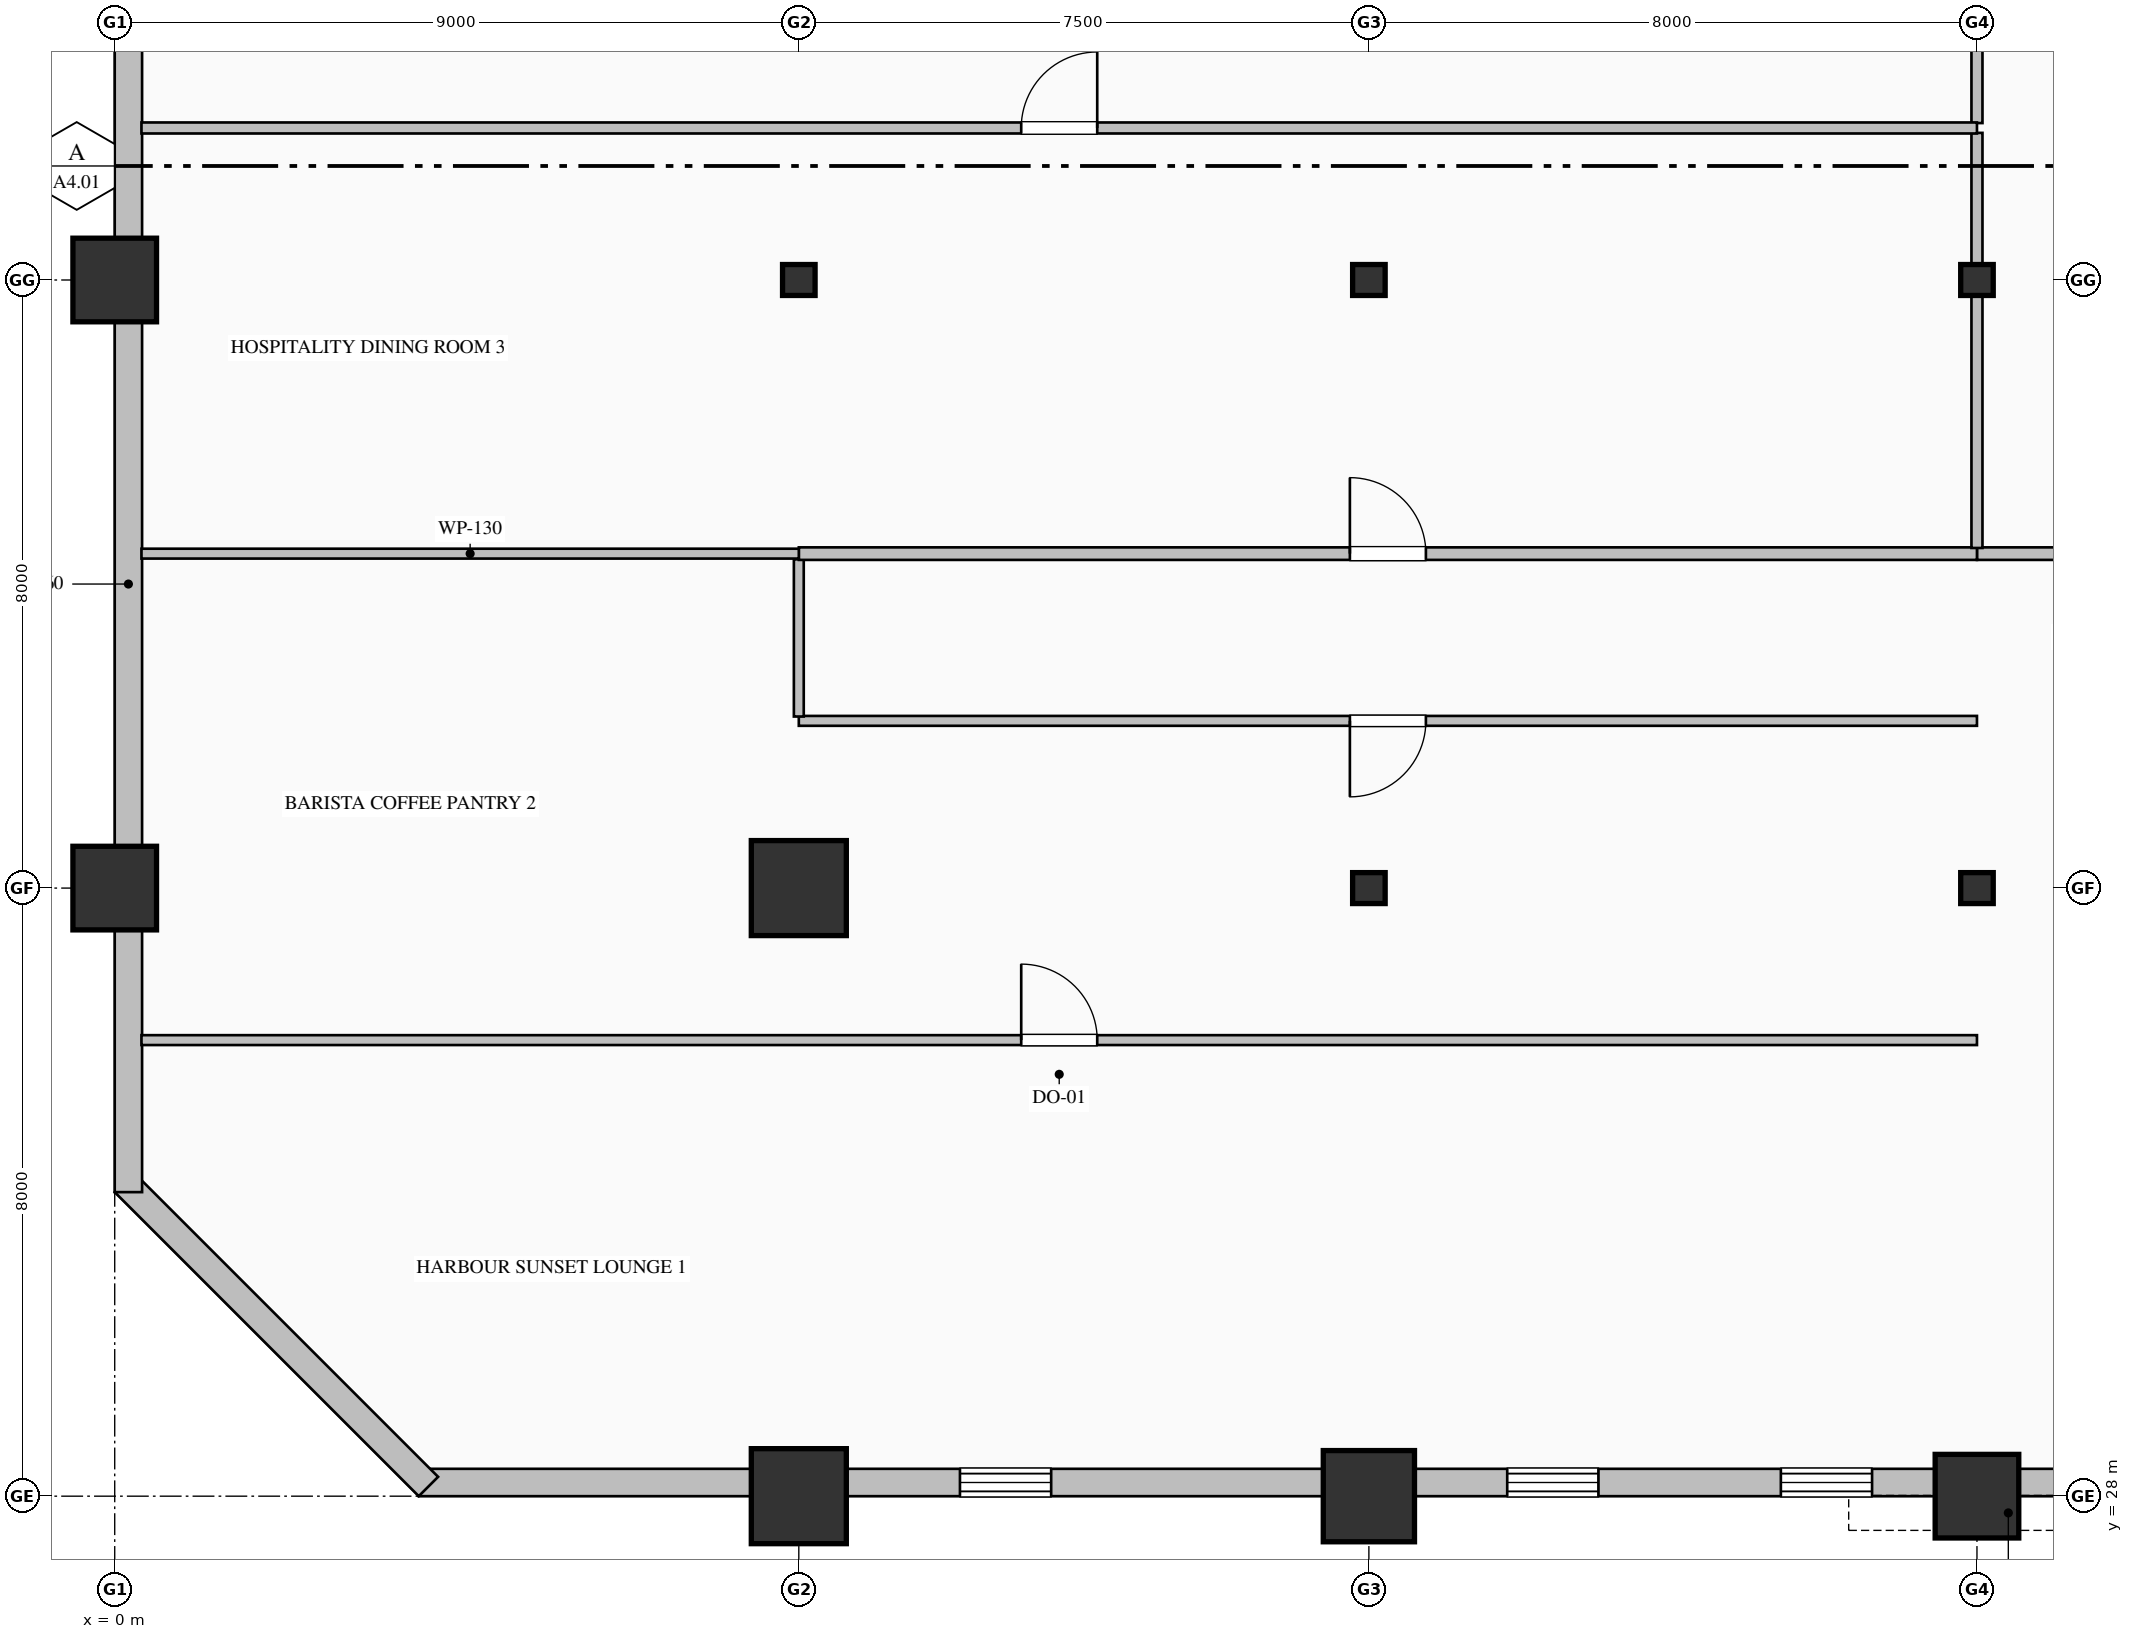
"""IFC4 building model, lengths in metres.
Left out: names, types, materials, properties, quantities, classifications, styles, units other than length and angle.
Written with IfcOpenShell. Run it as: python <this file> out.ifc"""

import sys

from ifc_helpers import new_model, si_unit, direction, frame, frame_2d, origin, origin_2d, place, context, subcontext, project, spatial, rectangle, hollow_rectangle, hollow_circle, i_section, extrude, element, fill, save


model = new_model("IFC4")
c1 = context("Model", 3, precision=1e-05, world=origin(), true_north=direction((0.0, 1.0)))
c2 = subcontext(c1, "Body", "Model", "MODEL_VIEW")
j1 = project(units=[si_unit("LENGTHUNIT", "METRE"), si_unit("PLANEANGLEUNIT", "RADIAN")], contexts=[c1])
p1 = place(None, origin())
s1 = spatial("IfcSite", under=j1, at=p1, CompositionType="ELEMENT")
p2 = place(p1, origin())
s2 = spatial("IfcBuilding", under=s1, at=p2, CompositionType="ELEMENT")
p3 = place(p2, frame((0.0, 0.0, 76.2)))
s3 = spatial("IfcBuildingStorey", under=s2, at=p3, CompositionType="ELEMENT", Elevation=76.2)
for number, where, z_axis, x_axis in (
    (1, (0.0, 36.0, 0.0), (0.0, 0.0, 1.0), (1.0, 0.0, 0.0)),
    (2, (0.0, 44.0, 0.0), (0.0, 0.0, 1.0), (1.0, 0.0, 0.0)),
):
    element("IfcColumn", number, at=place(p3, frame(where, z_axis=z_axis, x_axis=x_axis)), inside=s3, PredefinedType="COLUMN", context=c2, shape_type="SweptSolid", body=[
        extrude(hollow_rectangle(XDim=1.1, YDim=1.1, WallThickness=0.04, at=origin_2d()), origin(), (0.0, 0.0, 1.0), 4.0),
    ])
for number, where, z_axis, x_axis in (
    (3, (9.0, 28.0, 0.0), (0.0, 0.0, 1.0), (1.0, 0.0, 0.0)),
    (4, (9.0, 36.0, 0.0), (0.0, 0.0, 1.0), (1.0, 0.0, 0.0)),
):
    element("IfcColumn", number, at=place(p3, frame(where, z_axis=z_axis, x_axis=x_axis)), inside=s3, PredefinedType="COLUMN", context=c2, shape_type="SweptSolid", body=[
        extrude(hollow_rectangle(XDim=1.25, YDim=1.25, WallThickness=0.045, at=origin_2d()), origin(), (0.0, 0.0, 1.0), 4.0),
    ])
p4 = place(p3, frame((9.0, 44.0, 0.0), z_axis=(0.0, 0.0, 1.0), x_axis=(1.0, 0.0, 0.0)))
e5 = element("IfcColumn", 5, at=p4, inside=s3, PredefinedType="COLUMN", context=c2, shape_type="SweptSolid", body=[
    extrude(i_section(OverallWidth=0.407, OverallDepth=0.428, WebThickness=0.02, FlangeThickness=0.035, FilletRadius=0.022, at=origin_2d()), origin(), (0.0, 0.0, 1.0), 4.0),
])
p5 = place(p3, frame((16.5, 28.0, 0.0), z_axis=(0.0, 0.0, 1.0), x_axis=(1.0, 0.0, 0.0)))
e6 = element("IfcColumn", 6, at=p5, inside=s3, PredefinedType="COLUMN", context=c2, shape_type="SweptSolid", body=[
    extrude(hollow_circle(Radius=0.6, WallThickness=0.04, at=origin_2d()), origin(), (0.0, 0.0, 1.0), 4.0),
])
for number, where, z_axis, x_axis in (
    (7, (16.5, 36.0, 0.0), (0.0, 0.0, 1.0), (1.0, 0.0, 0.0)),
    (8, (16.5, 44.0, 0.0), (0.0, 0.0, 1.0), (1.0, 0.0, 0.0)),
):
    element("IfcColumn", number, at=place(p3, frame(where, z_axis=z_axis, x_axis=x_axis)), inside=s3, PredefinedType="COLUMN", context=c2, shape_type="SweptSolid", body=[
        extrude(i_section(OverallWidth=0.407, OverallDepth=0.428, WebThickness=0.02, FlangeThickness=0.035, FilletRadius=0.022, at=origin_2d()), origin(), (0.0, 0.0, 1.0), 4.0),
    ])
p6 = place(p3, frame((24.5, 28.0, 0.0), z_axis=(0.0, 0.0, 1.0), x_axis=(1.0, 0.0, 0.0)))
e9 = element("IfcColumn", 9, at=p6, inside=s3, PredefinedType="COLUMN", context=c2, shape_type="SweptSolid", body=[
    extrude(hollow_rectangle(XDim=1.1, YDim=1.1, WallThickness=0.04, at=origin_2d()), origin(), (0.0, 0.0, 1.0), 4.0),
])
for number, where, z_axis, x_axis in (
    (10, (24.5, 36.0, 0.0), (0.0, 0.0, 1.0), (1.0, 0.0, 0.0)),
    (11, (24.5, 44.0, 0.0), (0.0, 0.0, 1.0), (1.0, 0.0, 0.0)),
):
    element("IfcColumn", number, at=place(p3, frame(where, z_axis=z_axis, x_axis=x_axis)), inside=s3, PredefinedType="COLUMN", context=c2, shape_type="SweptSolid", body=[
        extrude(i_section(OverallWidth=0.407, OverallDepth=0.428, WebThickness=0.02, FlangeThickness=0.035, FilletRadius=0.022, at=origin_2d()), origin(), (0.0, 0.0, 1.0), 4.0),
    ])
p7 = place(p3, frame((40.52, 28.18, 0.0), z_axis=(0.0, 0.0, 1.0), x_axis=(-1.0, 0.0, 0.0)))
e12 = element("IfcWall", 12, at=p7, inside=s3, PredefinedType="SOLIDWALL", context=c2, shape_type="SweptSolid", body=[
    extrude(rectangle(XDim=36.52, YDim=0.36, at=frame_2d((18.26, 0.0))), origin(), (0.0, 0.0, 1.0), 3.05),
])
p8 = place(p7, frame((3.0, 0.0, 0.7)))
e13 = element("IfcOpeningElement", 13, at=p8, cuts=e12, PredefinedType="OPENING", context=c2, shape_type="SweptSolid", body=[
    extrude(rectangle(XDim=1.2, YDim=1.85, at=frame_2d((0.6, 0.925))), frame((0.0, 0.19, 0.0), z_axis=(0.0, -1.0, 0.0), x_axis=(1.0, 0.0, 0.0)), (0.0, 0.0, 1.0), 0.38),
])
p9 = place(p7, frame((10.2, 0.0, 0.7)))
e14 = element("IfcOpeningElement", 14, at=p9, cuts=e12, PredefinedType="OPENING", context=c2, shape_type="SweptSolid", body=[
    extrude(rectangle(XDim=1.2, YDim=1.85, at=frame_2d((0.6, 0.925))), frame((0.0, 0.19, 0.0), z_axis=(0.0, -1.0, 0.0), x_axis=(1.0, 0.0, 0.0)), (0.0, 0.0, 1.0), 0.38),
])
p10 = place(p7, frame((13.8, 0.0, 0.7)))
e15 = element("IfcOpeningElement", 15, at=p10, cuts=e12, PredefinedType="OPENING", context=c2, shape_type="SweptSolid", body=[
    extrude(rectangle(XDim=1.2, YDim=1.85, at=frame_2d((0.6, 0.925))), frame((0.0, 0.19, 0.0), z_axis=(0.0, -1.0, 0.0), x_axis=(1.0, 0.0, 0.0)), (0.0, 0.0, 1.0), 0.38),
])
p11 = place(p7, frame((17.4, 0.0, 0.7)))
e16 = element("IfcOpeningElement", 16, at=p11, cuts=e12, PredefinedType="OPENING", context=c2, shape_type="SweptSolid", body=[
    extrude(rectangle(XDim=1.2, YDim=1.85, at=frame_2d((0.6, 0.925))), frame((0.0, 0.19, 0.0), z_axis=(0.0, -1.0, 0.0), x_axis=(1.0, 0.0, 0.0)), (0.0, 0.0, 1.0), 0.38),
])
p12 = place(p7, frame((21.0, 0.0, 0.7)))
e17 = element("IfcOpeningElement", 17, at=p12, cuts=e12, PredefinedType="OPENING", context=c2, shape_type="SweptSolid", body=[
    extrude(rectangle(XDim=1.2, YDim=1.85, at=frame_2d((0.6, 0.925))), frame((0.0, 0.19, 0.0), z_axis=(0.0, -1.0, 0.0), x_axis=(1.0, 0.0, 0.0)), (0.0, 0.0, 1.0), 0.38),
])
p13 = place(p7, frame((28.2, 0.0, 0.7)))
e18 = element("IfcOpeningElement", 18, at=p13, cuts=e12, PredefinedType="OPENING", context=c2, shape_type="SweptSolid", body=[
    extrude(rectangle(XDim=1.2, YDim=1.85, at=frame_2d((0.6, 0.925))), frame((0.0, 0.19, 0.0), z_axis=(0.0, -1.0, 0.0), x_axis=(1.0, 0.0, 0.0)), (0.0, 0.0, 1.0), 0.38),
])
p14 = place(p3, frame((4.127, 28.127, 0.0), z_axis=(0.0, 0.0, 1.0), x_axis=(-0.707106781187, 0.707106781187, 0.0)))
e19 = element("IfcWall", 19, at=p14, inside=s3, PredefinedType="SOLIDWALL", context=c2, shape_type="SweptSolid", body=[
    extrude(rectangle(XDim=5.657, YDim=0.36, at=frame_2d((2.828, 0.0))), origin(), (0.0, 0.0, 1.0), 3.75),
])
p15 = place(p3, frame((0.18, 32.0, 0.0), z_axis=(0.0, 0.0, 1.0), x_axis=(0.0, 1.0, 0.0)))
e20 = element("IfcWall", 20, at=p15, inside=s3, PredefinedType="SOLIDWALL", context=c2, shape_type="SweptSolid", body=[
    extrude(rectangle(XDim=16.0, YDim=0.36, at=frame_2d((8.0, 0.0))), origin(), (0.0, 0.0, 1.0), 3.25),
])
p16 = place(p3, frame((24.5, 40.4, 0.0), z_axis=(0.0, 0.0, 1.0), x_axis=(1.0, 0.0, 0.0)))
e21 = element("IfcWall", 21, at=p16, inside=s3, PredefinedType="PARTITIONING", context=c2, shape_type="SweptSolid", body=[
    extrude(rectangle(XDim=13.3, YDim=0.165, at=frame_2d((6.65, 0.0))), origin(), (0.0, 0.0, 1.0), 3.75),
])
p17 = place(p16, frame((6.15, 0.0, 0.0)))
e22 = element("IfcOpeningElement", 22, at=p17, cuts=e21, PredefinedType="OPENING", context=c2, shape_type="SweptSolid", body=[
    extrude(rectangle(XDim=1.0, YDim=2.15, at=frame_2d((0.5, 1.075))), frame((0.0, 0.093, 0.0), z_axis=(0.0, -1.0, 0.0), x_axis=(1.0, 0.0, 0.0)), (0.0, 0.0, 1.0), 0.185),
])
p18 = place(p3, frame((24.5, 38.2, 0.0), z_axis=(0.0, 0.0, 1.0), x_axis=(-1.0, 0.0, 0.0)))
e23 = element("IfcWall", 23, at=p18, inside=s3, PredefinedType="PARTITIONING", context=c2, shape_type="SweptSolid", body=[
    extrude(rectangle(XDim=15.5, YDim=0.13, at=frame_2d((7.75, 0.0))), origin(), (0.0, 0.0, 1.0), 3.75),
])
p19 = place(p18, frame((7.25, 0.0, 0.0)))
e24 = element("IfcOpeningElement", 24, at=p19, cuts=e23, PredefinedType="OPENING", context=c2, shape_type="SweptSolid", body=[
    extrude(rectangle(XDim=1.0, YDim=2.15, at=frame_2d((0.5, 1.075))), frame((0.0, 0.075, 0.0), z_axis=(0.0, -1.0, 0.0), x_axis=(1.0, 0.0, 0.0)), (0.0, 0.0, 1.0), 0.15),
])
p20 = place(p3, frame((9.0, 38.257, 0.0), z_axis=(0.0, 0.0, 1.0), x_axis=(0.0, 1.0, 0.0)))
e25 = element("IfcWall", 25, at=p20, inside=s3, PredefinedType="PARTITIONING", context=c2, shape_type="SweptSolid", body=[
    extrude(rectangle(XDim=2.068, YDim=0.13, at=frame_2d((1.034, 0.0))), origin(), (0.0, 0.0, 1.0), 3.042),
])
p21 = place(p3, frame((9.0, 40.4, 0.0), z_axis=(0.0, 0.0, 1.0), x_axis=(1.0, 0.0, 0.0)))
e26 = element("IfcWall", 26, at=p21, inside=s3, PredefinedType="PARTITIONING", context=c2, shape_type="SweptSolid", body=[
    extrude(rectangle(XDim=15.5, YDim=0.165, at=frame_2d((7.75, 0.0))), origin(), (0.0, 0.0, 1.0), 3.75),
])
p22 = place(p21, frame((7.25, 0.0, 0.0)))
e27 = element("IfcOpeningElement", 27, at=p22, cuts=e26, PredefinedType="OPENING", context=c2, shape_type="SweptSolid", body=[
    extrude(rectangle(XDim=1.0, YDim=2.15, at=frame_2d((0.5, 1.075))), frame((0.0, 0.093, 0.0), z_axis=(0.0, -1.0, 0.0), x_axis=(1.0, 0.0, 0.0)), (0.0, 0.0, 1.0), 0.185),
])
p23 = place(p3, frame((24.5, 40.475, 0.0), z_axis=(0.0, 0.0, 1.0), x_axis=(0.0, 1.0, 0.0)))
e28 = element("IfcWall", 28, at=p23, inside=s3, PredefinedType="PARTITIONING", context=c2, shape_type="SweptSolid", body=[
    extrude(rectangle(XDim=5.461, YDim=0.145, at=frame_2d((2.73, 0.0))), origin(), (0.0, 0.0, 1.0), 3.042),
])
p24 = place(p3, frame((24.5, 46.064, 0.0), z_axis=(0.0, 0.0, 1.0), x_axis=(0.0, 1.0, 0.0)))
e29 = element("IfcWall", 29, at=p24, inside=s3, PredefinedType="PARTITIONING", context=c2, shape_type="SweptSolid", body=[
    extrude(rectangle(XDim=5.583, YDim=0.145, at=frame_2d((2.792, 0.0))), origin(), (0.0, 0.0, 1.0), 3.042),
])
p25 = place(p3, frame((0.352, 34.0, 0.0), z_axis=(0.0, 0.0, 1.0), x_axis=(1.0, 0.0, 0.0)))
e30 = element("IfcWall", 30, at=p25, inside=s3, PredefinedType="PARTITIONING", context=c2, shape_type="SweptSolid", body=[
    extrude(rectangle(XDim=24.148, YDim=0.13, at=frame_2d((12.074, 0.0))), origin(), (0.0, 0.0, 1.0), 3.75),
])
p26 = place(p25, frame((11.574, 0.0, 0.0)))
e31 = element("IfcOpeningElement", 31, at=p26, cuts=e30, PredefinedType="OPENING", context=c2, shape_type="SweptSolid", body=[
    extrude(rectangle(XDim=1.0, YDim=2.15, at=frame_2d((0.5, 1.075))), frame((0.0, 0.075, 0.0), z_axis=(0.0, -1.0, 0.0), x_axis=(1.0, 0.0, 0.0)), (0.0, 0.0, 1.0), 0.15),
])
p27 = place(p3, frame((0.352, 40.4, 0.0), z_axis=(0.0, 0.0, 1.0), x_axis=(1.0, 0.0, 0.0)))
e32 = element("IfcWall", 32, at=p27, inside=s3, PredefinedType="PARTITIONING", context=c2, shape_type="SweptSolid", body=[
    extrude(rectangle(XDim=8.648, YDim=0.13, at=frame_2d((4.324, 0.0))), origin(), (0.0, 0.0, 1.0), 3.75),
])
p28 = place(p3, frame((0.352, 46.0, 0.0), z_axis=(0.0, 0.0, 1.0), x_axis=(1.0, 0.0, 0.0)))
e33 = element("IfcWall", 33, at=p28, inside=s3, PredefinedType="PARTITIONING", context=c2, shape_type="SweptSolid", body=[
    extrude(rectangle(XDim=24.148, YDim=0.145, at=frame_2d((12.074, 0.0))), origin(), (0.0, 0.0, 1.0), 3.75),
])
p29 = place(p28, frame((11.574, 0.0, 0.0)))
e34 = element("IfcOpeningElement", 34, at=p29, cuts=e33, PredefinedType="OPENING", context=c2, shape_type="SweptSolid", body=[
    extrude(rectangle(XDim=1.0, YDim=2.15, at=frame_2d((0.5, 1.075))), frame((0.0, 0.083, 0.0), z_axis=(0.0, -1.0, 0.0), x_axis=(1.0, 0.0, 0.0)), (0.0, 0.0, 1.0), 0.165),
])
p30 = place(p11, origin())
e35 = element("IfcWindow", 35, at=p30, inside=s3, PartitioningType="DOUBLE_PANEL_VERTICAL", PredefinedType="WINDOW", context=c2, shape_type="SweptSolid", body=[
    extrude(rectangle(XDim=1.2, YDim=1.85, at=frame_2d((0.6, 0.925))), frame((0.0, 0.15, 0.0), z_axis=(0.0, -1.0, 0.0), x_axis=(1.0, 0.0, 0.0)), (0.0, 0.0, 1.0), 0.06),
])
fill(e16, e35)
p31 = place(p12, origin())
e36 = element("IfcWindow", 36, at=p31, inside=s3, PartitioningType="DOUBLE_PANEL_VERTICAL", PredefinedType="WINDOW", context=c2, shape_type="SweptSolid", body=[
    extrude(rectangle(XDim=1.2, YDim=1.85, at=frame_2d((0.6, 0.925))), frame((0.0, 0.15, 0.0), z_axis=(0.0, -1.0, 0.0), x_axis=(1.0, 0.0, 0.0)), (0.0, 0.0, 1.0), 0.06),
])
fill(e17, e36)
p32 = place(p13, origin())
e37 = element("IfcWindow", 37, at=p32, inside=s3, PartitioningType="DOUBLE_PANEL_VERTICAL", PredefinedType="WINDOW", context=c2, shape_type="SweptSolid", body=[
    extrude(rectangle(XDim=1.2, YDim=1.85, at=frame_2d((0.6, 0.925))), frame((0.0, 0.15, 0.0), z_axis=(0.0, -1.0, 0.0), x_axis=(1.0, 0.0, 0.0)), (0.0, 0.0, 1.0), 0.06),
])
fill(e18, e37)
p33 = place(p26, origin())
e38 = element("IfcDoor", 38, at=p33, inside=s3, OperationType="SINGLE_SWING_LEFT", PredefinedType="DOOR", context=c2, shape_type="SweptSolid", body=[
    extrude(rectangle(XDim=1.0, YDim=2.15, at=frame_2d((0.5, 1.075))), frame((0.0, 0.025, 0.0), z_axis=(0.0, -1.0, 0.0), x_axis=(1.0, 0.0, 0.0)), (0.0, 0.0, 1.0), 0.05),
])
fill(e31, e38)
p34 = place(p19, origin())
e39 = element("IfcDoor", 39, at=p34, inside=s3, OperationType="SINGLE_SWING_RIGHT", PredefinedType="DOOR", context=c2, shape_type="SweptSolid", body=[
    extrude(rectangle(XDim=1.0, YDim=2.15, at=frame_2d((0.5, 1.075))), frame((0.0, 0.025, 0.0), z_axis=(0.0, -1.0, 0.0), x_axis=(1.0, 0.0, 0.0)), (0.0, 0.0, 1.0), 0.05),
])
fill(e24, e39)
p35 = place(p22, origin())
e40 = element("IfcDoor", 40, at=p35, inside=s3, OperationType="SINGLE_SWING_LEFT", PredefinedType="DOOR", context=c2, shape_type="SweptSolid", body=[
    extrude(rectangle(XDim=1.0, YDim=2.15, at=frame_2d((0.5, 1.075))), frame((0.0, 0.025, 0.0), z_axis=(0.0, -1.0, 0.0), x_axis=(1.0, 0.0, 0.0)), (0.0, 0.0, 1.0), 0.05),
])
fill(e27, e40)
p36 = place(p29, origin())
e41 = element("IfcDoor", 41, at=p36, inside=s3, OperationType="SINGLE_SWING_RIGHT", PredefinedType="DOOR", context=c2, shape_type="SweptSolid", body=[
    extrude(rectangle(XDim=1.0, YDim=2.15, at=frame_2d((0.5, 1.075))), frame((0.0, 0.025, 0.0), z_axis=(0.0, -1.0, 0.0), x_axis=(1.0, 0.0, 0.0)), (0.0, 0.0, 1.0), 0.05),
])
fill(e34, e41)
save(model, sys.argv[1])
